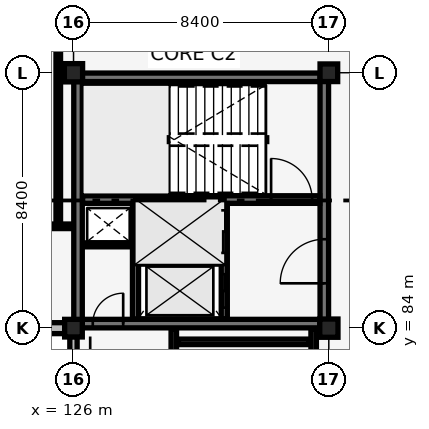
"""IFC4 building model, lengths in metres.
Left out: names, types, materials, properties, quantities, classifications, styles, units other than length and angle.
Written with IfcOpenShell. Run it as: python <this file> out.ifc"""

import sys

from ifc_helpers import new_model, si_unit, direction, frame, frame_2d, origin, origin_2d, place, context, subcontext, project, spatial, rectangle, extrude, element, fill, save


model = new_model("IFC4")
c1 = context("Model", 3, precision=1e-05, world=origin(), true_north=direction((0.0, 1.0)))
c2 = subcontext(c1, "Body", "Model", "MODEL_VIEW")
j1 = project(units=[si_unit("LENGTHUNIT", "METRE"), si_unit("PLANEANGLEUNIT", "RADIAN")], contexts=[c1])
p1 = place(None, origin())
s1 = spatial("IfcSite", under=j1, at=p1, CompositionType="ELEMENT")
p2 = place(p1, origin())
s2 = spatial("IfcBuilding", under=s1, at=p2, CompositionType="ELEMENT")
p3 = place(p2, frame((0.0, 0.0, 18.02)))
s3 = spatial("IfcBuildingStorey", under=s2, at=p3, CompositionType="ELEMENT", Elevation=18.02)
p4 = place(p3, frame((126.15, 84.15, 0.0), z_axis=(0.0, 0.0, 1.0), x_axis=(1.0, 0.0, 0.0)))
e1 = element("IfcWall", 1, at=p4, inside=s3, PredefinedType="SHEAR", context=c2, shape_type="SweptSolid", body=[
    extrude(rectangle(XDim=8.1, YDim=0.28, at=frame_2d((4.05, 0.0))), origin(), (0.0, 0.0, 1.0), 3.78),
])
p5 = place(p4, frame((0.485, 0.0, 0.0)))
e2 = element("IfcOpeningElement", 2, at=p5, cuts=e1, PredefinedType="OPENING", context=c2, shape_type="SweptSolid", body=[
    extrude(rectangle(XDim=1.0, YDim=2.15, at=frame_2d((0.5, 1.075))), frame((0.0, 0.15, 0.0), z_axis=(0.0, -1.0, 0.0), x_axis=(1.0, 0.0, 0.0)), (0.0, 0.0, 1.0), 0.3),
])
for number, where, z_axis, x_axis in (
    (3, (126.15, 92.25, 0.0), (0.0, 0.0, 1.0), (1.0, 0.0, 0.0)),
    (4, (126.15, 84.15, 0.0), (0.0, 0.0, 1.0), (0.0, 1.0, 0.0)),
):
    element("IfcWall", number, at=place(p3, frame(where, z_axis=z_axis, x_axis=x_axis)), inside=s3, PredefinedType="SHEAR", context=c2, shape_type="SweptSolid", body=[
        extrude(rectangle(XDim=8.1, YDim=0.28, at=frame_2d((4.05, 0.0))), origin(), (0.0, 0.0, 1.0), 3.78),
    ])
p6 = place(p3, frame((134.25, 84.15, 0.0), z_axis=(0.0, 0.0, 1.0), x_axis=(0.0, 1.0, 0.0)))
e5 = element("IfcWall", 5, at=p6, inside=s3, PredefinedType="SHEAR", context=c2, shape_type="SweptSolid", body=[
    extrude(rectangle(XDim=8.1, YDim=0.28, at=frame_2d((4.05, 0.0))), origin(), (0.0, 0.0, 1.0), 3.78),
])
p7 = place(p6, frame((1.325, 0.0, 0.0)))
e6 = element("IfcOpeningElement", 6, at=p7, cuts=e5, PredefinedType="OPENING", context=c2, shape_type="SweptSolid", body=[
    extrude(rectangle(XDim=1.45, YDim=2.15, at=frame_2d((0.725, 1.075))), frame((0.0, 0.15, 0.0), z_axis=(0.0, -1.0, 0.0), x_axis=(1.0, 0.0, 0.0)), (0.0, 0.0, 1.0), 0.3),
])
p8 = place(p3, frame((126.3, 88.23, 0.0), z_axis=(0.0, 0.0, 1.0), x_axis=(1.0, 0.0, 0.0)))
e7 = element("IfcWall", 7, at=p8, inside=s3, PredefinedType="SHEAR", context=c2, shape_type="SweptSolid", body=[
    extrude(rectangle(XDim=7.8, YDim=0.25, at=frame_2d((3.9, 0.0))), origin(), (0.0, 0.0, 1.0), 3.78),
])
p9 = place(p8, frame((6.2, 0.0, 0.0)))
e8 = element("IfcOpeningElement", 8, at=p9, cuts=e7, PredefinedType="OPENING", context=c2, shape_type="SweptSolid", body=[
    extrude(rectangle(XDim=1.35, YDim=2.15, at=frame_2d((0.675, 1.075))), frame((0.0, 0.135, 0.0), z_axis=(0.0, -1.0, 0.0), x_axis=(1.0, 0.0, 0.0)), (0.0, 0.0, 1.0), 0.27),
])
p10 = place(p3, frame((126.0, 84.0, 0.0), z_axis=(0.0, 0.0, 1.0), x_axis=(1.0, 0.0, 0.0)))
e9 = element("IfcColumn", 9, at=p10, inside=s3, PredefinedType="COLUMN", context=c2, shape_type="SweptSolid", body=[
    extrude(rectangle(XDim=0.58, YDim=0.58, at=origin_2d()), origin(), (0.0, 0.0, 1.0), 3.78),
])
for number, where, z_axis, x_axis in (
    (10, (126.0, 92.4, 0.0), (0.0, 0.0, 1.0), (1.0, 0.0, 0.0)),
    (11, (134.4, 84.0, 0.0), (0.0, 0.0, 1.0), (1.0, 0.0, 0.0)),
):
    element("IfcColumn", number, at=place(p3, frame(where, z_axis=z_axis, x_axis=x_axis)), inside=s3, PredefinedType="COLUMN", context=c2, shape_type="SweptSolid", body=[
        extrude(rectangle(XDim=0.6, YDim=0.6, at=origin_2d()), origin(), (0.0, 0.0, 1.0), 3.78),
    ])
p11 = place(p3, frame((134.4, 92.4, 0.0), z_axis=(0.0, 0.0, 1.0), x_axis=(1.0, 0.0, 0.0)))
e12 = element("IfcColumn", 12, at=p11, inside=s3, PredefinedType="COLUMN", context=c2, shape_type="SweptSolid", body=[
    extrude(rectangle(XDim=0.58, YDim=0.58, at=origin_2d()), origin(), (0.0, 0.0, 1.0), 3.78),
])
p12 = place(p3, frame((117.81, 84.0, 0.0), z_axis=(0.0, 0.0, 1.0), x_axis=(1.0, 0.0, 0.0)))
e13 = element("IfcWall", 13, at=p12, inside=s3, PredefinedType="SOLIDWALL", context=c2, shape_type="SweptSolid", body=[
    extrude(rectangle(XDim=7.915, YDim=0.36, at=frame_2d((3.958, 0.0))), origin(), (0.0, 0.0, 1.0), 3.78),
])
p13 = place(p12, frame((0.984, 0.0, 0.75)))
e14 = element("IfcOpeningElement", 14, at=p13, cuts=e13, PredefinedType="OPENING", context=c2, shape_type="SweptSolid", body=[
    extrude(rectangle(XDim=1.04, YDim=2.6, at=frame_2d((0.52, 1.3))), frame((0.0, 0.19, 0.0), z_axis=(0.0, -1.0, 0.0), x_axis=(1.0, 0.0, 0.0)), (0.0, 0.0, 1.0), 0.38),
])
p14 = place(p12, frame((2.567, 0.0, 0.75)))
e15 = element("IfcOpeningElement", 15, at=p14, cuts=e13, PredefinedType="OPENING", context=c2, shape_type="SweptSolid", body=[
    extrude(rectangle(XDim=1.04, YDim=2.6, at=frame_2d((0.52, 1.3))), frame((0.0, 0.19, 0.0), z_axis=(0.0, -1.0, 0.0), x_axis=(1.0, 0.0, 0.0)), (0.0, 0.0, 1.0), 0.38),
])
p15 = place(p12, frame((4.308, 0.0, 0.75)))
e16 = element("IfcOpeningElement", 16, at=p15, cuts=e13, PredefinedType="OPENING", context=c2, shape_type="SweptSolid", body=[
    extrude(rectangle(XDim=1.04, YDim=2.6, at=frame_2d((0.52, 1.3))), frame((0.0, 0.19, 0.0), z_axis=(0.0, -1.0, 0.0), x_axis=(1.0, 0.0, 0.0)), (0.0, 0.0, 1.0), 0.38),
])
p16 = place(p12, frame((5.891, 0.0, 0.75)))
e17 = element("IfcOpeningElement", 17, at=p16, cuts=e13, PredefinedType="OPENING", context=c2, shape_type="SweptSolid", body=[
    extrude(rectangle(XDim=1.04, YDim=2.6, at=frame_2d((0.52, 1.3))), frame((0.0, 0.19, 0.0), z_axis=(0.0, -1.0, 0.0), x_axis=(1.0, 0.0, 0.0)), (0.0, 0.0, 1.0), 0.38),
])
p17 = place(p3, frame((126.0, 75.885, 0.0), z_axis=(0.0, 0.0, 1.0), x_axis=(0.0, 1.0, 0.0)))
e18 = element("IfcWall", 18, at=p17, inside=s3, PredefinedType="SOLIDWALL", context=c2, shape_type="SweptSolid", body=[
    extrude(rectangle(XDim=7.84, YDim=0.24, at=frame_2d((3.92, 0.0))), origin(), (0.0, 0.0, 1.0), 3.18),
])
p18 = place(p17, frame((0.804, 0.0, 0.35)))
e19 = element("IfcOpeningElement", 19, at=p18, cuts=e18, PredefinedType="OPENING", context=c2, shape_type="SweptSolid", body=[
    extrude(rectangle(XDim=0.44, YDim=1.25, at=frame_2d((0.22, 0.625))), frame((0.0, 0.13, 0.0), z_axis=(0.0, -1.0, 0.0), x_axis=(1.0, 0.0, 0.0)), (0.0, 0.0, 1.0), 0.26),
])
p19 = place(p17, frame((2.252, 0.0, 0.35)))
e20 = element("IfcOpeningElement", 20, at=p19, cuts=e18, PredefinedType="OPENING", context=c2, shape_type="SweptSolid", body=[
    extrude(rectangle(XDim=0.44, YDim=1.25, at=frame_2d((0.22, 0.625))), frame((0.0, 0.13, 0.0), z_axis=(0.0, -1.0, 0.0), x_axis=(1.0, 0.0, 0.0)), (0.0, 0.0, 1.0), 0.26),
])
p20 = place(p17, frame((3.7, 0.0, 0.35)))
e21 = element("IfcOpeningElement", 21, at=p20, cuts=e18, PredefinedType="OPENING", context=c2, shape_type="SweptSolid", body=[
    extrude(rectangle(XDim=0.44, YDim=1.25, at=frame_2d((0.22, 0.625))), frame((0.0, 0.13, 0.0), z_axis=(0.0, -1.0, 0.0), x_axis=(1.0, 0.0, 0.0)), (0.0, 0.0, 1.0), 0.26),
])
p21 = place(p17, frame((5.148, 0.0, 0.35)))
e22 = element("IfcOpeningElement", 22, at=p21, cuts=e18, PredefinedType="OPENING", context=c2, shape_type="SweptSolid", body=[
    extrude(rectangle(XDim=0.44, YDim=1.25, at=frame_2d((0.22, 0.625))), frame((0.0, 0.13, 0.0), z_axis=(0.0, -1.0, 0.0), x_axis=(1.0, 0.0, 0.0)), (0.0, 0.0, 1.0), 0.26),
])
p22 = place(p17, frame((6.596, 0.0, 0.35)))
e23 = element("IfcOpeningElement", 23, at=p22, cuts=e18, PredefinedType="OPENING", context=c2, shape_type="SweptSolid", body=[
    extrude(rectangle(XDim=0.44, YDim=1.25, at=frame_2d((0.22, 0.625))), frame((0.0, 0.13, 0.0), z_axis=(0.0, -1.0, 0.0), x_axis=(1.0, 0.0, 0.0)), (0.0, 0.0, 1.0), 0.26),
])
p23 = place(p3, frame((130.96, 84.3, 0.0), z_axis=(0.0, 0.0, 1.0), x_axis=(0.0, 1.0, 0.0)))
e24 = element("IfcWall", 24, at=p23, inside=s3, PredefinedType="SHEAR", context=c2, shape_type="SweptSolid", body=[
    extrude(rectangle(XDim=3.8, YDim=0.2, at=frame_2d((1.9, 0.0))), origin(), (0.0, 0.0, 1.0), 3.08),
])
p24 = place(p23, frame((0.375, 0.0, 0.0)))
e25 = element("IfcOpeningElement", 25, at=p24, cuts=e24, PredefinedType="OPENING", context=c2, shape_type="SweptSolid", body=[
    extrude(rectangle(XDim=1.1, YDim=2.15, at=frame_2d((0.55, 1.075))), frame((0.0, 0.11, 0.0), z_axis=(0.0, -1.0, 0.0), x_axis=(1.0, 0.0, 0.0)), (0.0, 0.0, 1.0), 0.22),
])
p25 = place(p23, frame((2.175, 0.0, 0.0)))
e26 = element("IfcOpeningElement", 26, at=p25, cuts=e24, PredefinedType="OPENING", context=c2, shape_type="SweptSolid", body=[
    extrude(rectangle(XDim=1.4, YDim=2.2, at=frame_2d((0.7, 1.1))), frame((0.0, 0.11, 0.0), z_axis=(0.0, -1.0, 0.0), x_axis=(1.0, 0.0, 0.0)), (0.0, 0.0, 1.0), 0.22),
])
p26 = place(p3, frame((128.04, 84.3, 0.0), z_axis=(0.0, 0.0, 1.0), x_axis=(0.0, 1.0, 0.0)))
e27 = element("IfcWall", 27, at=p26, inside=s3, PredefinedType="SHEAR", context=c2, shape_type="SweptSolid", body=[
    extrude(rectangle(XDim=3.8, YDim=0.2, at=frame_2d((1.9, 0.0))), origin(), (0.0, 0.0, 1.0), 3.08),
])
p27 = place(p3, frame((128.15, 86.2, 0.0), z_axis=(0.0, 0.0, 1.0), x_axis=(1.0, 0.0, 0.0)))
e28 = element("IfcWall", 28, at=p27, inside=s3, PredefinedType="SHEAR", context=c2, shape_type="SweptSolid", body=[
    extrude(rectangle(XDim=2.7, YDim=0.18, at=frame_2d((1.35, 0.0))), origin(), (0.0, 0.0, 1.0), 3.78),
])
p28 = place(p3, frame((126.32, 86.74, 0.0), z_axis=(0.0, 0.0, 1.0), x_axis=(1.0, 0.0, 0.0)))
e29 = element("IfcWall", 29, at=p28, inside=s3, PredefinedType="PARTITIONING", context=c2, shape_type="SweptSolid", body=[
    extrude(rectangle(XDim=1.62, YDim=0.13, at=frame_2d((0.81, 0.0))), origin(), (0.0, 0.0, 1.0), 3.78),
])
p29 = place(p3, frame((129.45, 83.55, 0.0), z_axis=(0.0, 0.0, 1.0), x_axis=(1.0, 0.0, 0.0)))
e30 = element("IfcWall", 30, at=p29, inside=s3, PredefinedType="PARTITIONING", context=c2, shape_type="SweptSolid", body=[
    extrude(rectangle(XDim=4.3, YDim=0.18, at=frame_2d((2.15, 0.0))), origin(), (0.0, 0.0, 1.0), 3.78),
])
for number, where, z_axis, x_axis in (
    (31, (129.3, 36.7, 0.0), (0.0, 0.0, 1.0), (0.0, 1.0, 0.0)),
    (32, (133.9, 36.7, 0.0), (0.0, 0.0, 1.0), (0.0, 1.0, 0.0)),
):
    element("IfcWall", number, at=place(p3, frame(where, z_axis=z_axis, x_axis=x_axis)), inside=s3, PredefinedType="PARTITIONING", context=c2, shape_type="SweptSolid", body=[
        extrude(rectangle(XDim=47.27, YDim=0.18, at=frame_2d((23.635, 0.0))), origin(), (0.0, 0.0, 1.0), 3.08),
    ])
p30 = place(p3, frame((109.23, 87.35, 0.0), z_axis=(0.0, 0.0, 1.0), x_axis=(1.0, 0.0, 0.0)))
e33 = element("IfcWall", 33, at=p30, inside=s3, PredefinedType="PARTITIONING", context=c2, shape_type="SweptSolid", body=[
    extrude(rectangle(XDim=16.74, YDim=0.15, at=frame_2d((8.37, 0.0))), origin(), (0.0, 0.0, 1.0), 3.18),
])
p31 = place(p30, frame((7.845, 0.0, 0.0)))
e34 = element("IfcOpeningElement", 34, at=p31, cuts=e33, PredefinedType="OPENING", context=c2, shape_type="SweptSolid", body=[
    extrude(rectangle(XDim=1.05, YDim=2.15, at=frame_2d((0.525, 1.075))), frame((0.0, 0.085, 0.0), z_axis=(0.0, -1.0, 0.0), x_axis=(1.0, 0.0, 0.0)), (0.0, 0.0, 1.0), 0.17),
])
p32 = place(p3, frame((125.5, 87.5, 0.0), z_axis=(0.0, 0.0, 1.0), x_axis=(0.0, 1.0, 0.0)))
e35 = element("IfcWall", 35, at=p32, inside=s3, PredefinedType="PARTITIONING", context=c2, shape_type="SweptSolid", body=[
    extrude(rectangle(XDim=29.92, YDim=0.15, at=frame_2d((14.96, 0.0))), origin(), (0.0, 0.0, 1.0), 3.78),
])
p33 = place(p9, origin())
e36 = element("IfcDoor", 36, at=p33, inside=s3, OperationType="SINGLE_SWING_LEFT", PredefinedType="DOOR", context=c2, shape_type="SweptSolid", body=[
    extrude(rectangle(XDim=1.35, YDim=2.15, at=frame_2d((0.675, 1.075))), frame((0.0, 0.025, 0.0), z_axis=(0.0, -1.0, 0.0), x_axis=(1.0, 0.0, 0.0)), (0.0, 0.0, 1.0), 0.05),
])
fill(e8, e36)
p34 = place(p24, origin())
e37 = element("IfcDoor", 37, at=p34, inside=s3, OperationType="SLIDING_TO_LEFT", PredefinedType="DOOR", context=c2, shape_type="SweptSolid", body=[
    extrude(rectangle(XDim=1.1, YDim=2.15, at=frame_2d((0.55, 1.075))), frame((0.0, 0.025, 0.0), z_axis=(0.0, -1.0, 0.0), x_axis=(1.0, 0.0, 0.0)), (0.0, 0.0, 1.0), 0.05),
])
fill(e25, e37)
p35 = place(p25, origin())
e38 = element("IfcDoor", 38, at=p35, inside=s3, OperationType="SLIDING_TO_LEFT", PredefinedType="DOOR", context=c2, shape_type="SweptSolid", body=[
    extrude(rectangle(XDim=1.4, YDim=2.2, at=frame_2d((0.7, 1.1))), frame((0.0, 0.025, 0.0), z_axis=(0.0, -1.0, 0.0), x_axis=(1.0, 0.0, 0.0)), (0.0, 0.0, 1.0), 0.05),
])
fill(e26, e38)
p36 = place(p7, origin())
e39 = element("IfcDoor", 39, at=p36, inside=s3, OperationType="DOUBLE_DOOR_SINGLE_SWING", PredefinedType="DOOR", context=c2, shape_type="SweptSolid", body=[
    extrude(rectangle(XDim=1.45, YDim=2.15, at=frame_2d((0.725, 1.075))), frame((0.0, 0.025, 0.0), z_axis=(0.0, -1.0, 0.0), x_axis=(1.0, 0.0, 0.0)), (0.0, 0.0, 1.0), 0.05),
])
fill(e6, e39)
p37 = place(p5, origin())
e40 = element("IfcDoor", 40, at=p37, inside=s3, OperationType="SINGLE_SWING_RIGHT", PredefinedType="DOOR", context=c2, shape_type="SweptSolid", body=[
    extrude(rectangle(XDim=1.0, YDim=2.15, at=frame_2d((0.5, 1.075))), frame((0.0, 0.025, 0.0), z_axis=(0.0, -1.0, 0.0), x_axis=(1.0, 0.0, 0.0)), (0.0, 0.0, 1.0), 0.05),
])
fill(e2, e40)
save(model, sys.argv[1])
